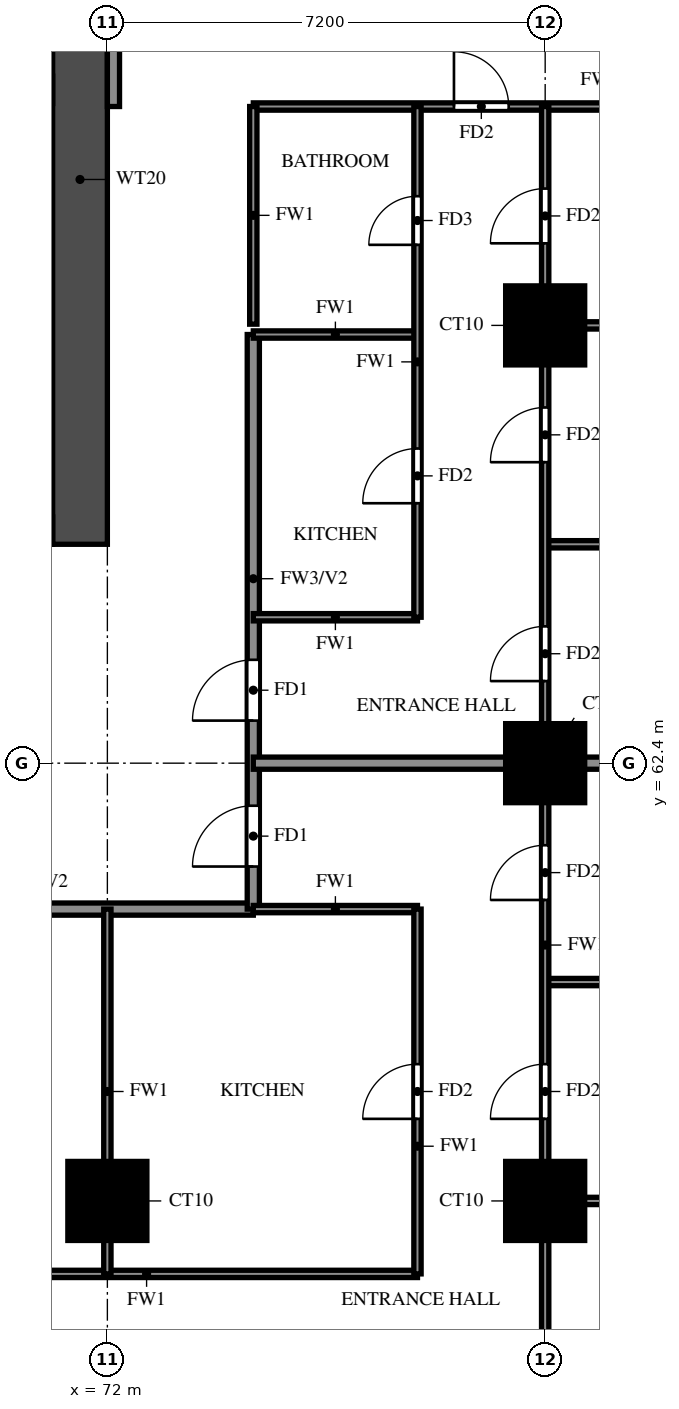
"""IFC4 building model, lengths in metres.
Left out: names, types, materials, properties, quantities, classifications, styles, units other than length and angle.
Written with IfcOpenShell. Run it as: python <this file> out.ifc"""

import sys

from ifc_helpers import new_model, si_unit, direction, frame, frame_2d, origin, origin_2d, place, context, subcontext, project, spatial, rectangle, extrude, source, transform, mapped, element, fill, save


model = new_model("IFC4")
c1 = context("Model", 3, precision=1e-05, world=origin(), true_north=direction((0.0, 1.0)))
c2 = subcontext(c1, "Body", "Model", "MODEL_VIEW")
j1 = project(units=[si_unit("LENGTHUNIT", "METRE"), si_unit("PLANEANGLEUNIT", "RADIAN")], contexts=[c1])
p1 = place(None, origin())
s1 = spatial("IfcSite", under=j1, at=p1, CompositionType="ELEMENT")
p2 = place(p1, origin())
s2 = spatial("IfcBuilding", under=s1, at=p2, CompositionType="ELEMENT")
p3 = place(p2, frame((0.0, 0.0, 79.5)))
s3 = spatial("IfcBuildingStorey", under=s2, at=p3, CompositionType="ELEMENT", Elevation=79.5)
m1 = source(origin(), c2, "Body", "SweptSolid", [
    extrude(rectangle(XDim=1.3, YDim=1.3, at=origin_2d()), origin(), (0.0, 0.0, 1.0), 3.18),
])
for number, where, z_axis, x_axis in (
    (1, (72.0, 55.2, 0.0), (0.0, 0.0, 1.0), (1.0, 0.0, 0.0)),
    (2, (79.2, 55.2, 0.0), (0.0, 0.0, 1.0), (1.0, 0.0, 0.0)),
    (3, (79.2, 62.4, 0.0), (0.0, 0.0, 1.0), (1.0, 0.0, 0.0)),
    (4, (79.2, 69.6, 0.0), (0.0, 0.0, 1.0), (1.0, 0.0, 0.0)),
):
    element("IfcColumn", number, at=place(p3, frame(where, z_axis=z_axis, x_axis=x_axis)), inside=s3, PredefinedType="COLUMN", context=c2, shape_type="MappedRepresentation", body=[
        mapped(m1, transform((0.0, 0.0, 0.0))),
    ])
p4 = place(p3, frame((71.55, 66.0, 0.0), z_axis=(0.0, 0.0, 1.0), x_axis=(0.0, 1.0, 0.0)))
e5 = element("IfcWall", 5, at=p4, inside=s3, PredefinedType="SHEAR", context=c2, shape_type="SweptSolid", body=[
    extrude(rectangle(XDim=12.0, YDim=0.9, at=frame_2d((6.0, 0.0))), origin(), (0.0, 0.0, 1.0), 3.18),
])
p5 = place(p3, frame((29.7, 66.225, 0.0), z_axis=(0.0, 0.0, 1.0), x_axis=(1.0, 0.0, 0.0)))
e6 = element("IfcWall", 6, at=p5, inside=s3, PredefinedType="SHEAR", context=c2, shape_type="SweptSolid", body=[
    extrude(rectangle(XDim=41.4, YDim=0.45, at=frame_2d((20.7, 0.0))), origin(), (0.0, 0.0, 1.0), 3.18),
])
p6 = place(p5, frame((0.925, 0.0, 0.0)))
e7 = element("IfcOpeningElement", 7, at=p6, cuts=e6, PredefinedType="OPENING", context=c2, shape_type="SweptSolid", body=[
    extrude(rectangle(XDim=1.1, YDim=2.1, at=frame_2d((0.55, 1.05))), frame((0.0, 0.235, 0.0), z_axis=(0.0, -1.0, 0.0), x_axis=(1.0, 0.0, 0.0)), (0.0, 0.0, 1.0), 0.47),
])
p7 = place(p5, frame((3.738, 0.0, 0.0)))
e8 = element("IfcOpeningElement", 8, at=p7, cuts=e6, PredefinedType="OPENING", context=c2, shape_type="SweptSolid", body=[
    extrude(rectangle(XDim=1.8, YDim=2.1, at=frame_2d((0.9, 1.05))), frame((0.0, 0.235, 0.0), z_axis=(0.0, -1.0, 0.0), x_axis=(1.0, 0.0, 0.0)), (0.0, 0.0, 1.0), 0.47),
])
p8 = place(p3, frame((67.2, 60.0, 0.0), z_axis=(0.0, 0.0, 1.0), x_axis=(1.0, 0.0, 0.0)))
e9 = element("IfcWall", 9, at=p8, inside=s3, PredefinedType="SOLIDWALL", context=c2, shape_type="SweptSolid", body=[
    extrude(rectangle(XDim=7.2, YDim=0.2, at=frame_2d((3.6, 0.0))), origin(), (0.0, 0.0, 1.0), 3.18),
])
p9 = place(p3, frame((72.1, 73.2, 0.0), z_axis=(0.0, 0.0, 1.0), x_axis=(0.0, 1.0, 0.0)))
e10 = element("IfcWall", 10, at=p9, inside=s3, PredefinedType="SOLIDWALL", context=c2, shape_type="SweptSolid", body=[
    extrude(rectangle(XDim=4.8, YDim=0.2, at=frame_2d((2.4, 0.0))), origin(), (0.0, 0.0, 1.0), 3.18),
])
p10 = place(p3, frame((74.4, 60.0, 0.0), z_axis=(0.0, 0.0, 1.0), x_axis=(0.0, 1.0, 0.0)))
e11 = element("IfcWall", 11, at=p10, inside=s3, PredefinedType="SOLIDWALL", context=c2, shape_type="SweptSolid", body=[
    extrude(rectangle(XDim=9.45, YDim=0.2, at=frame_2d((4.725, 0.0))), origin(), (0.0, 0.0, 1.0), 3.18),
])
p11 = place(p10, frame((0.7, 0.0, 0.0)))
e12 = element("IfcOpeningElement", 12, at=p11, cuts=e11, PredefinedType="OPENING", context=c2, shape_type="SweptSolid", body=[
    extrude(rectangle(XDim=1.0, YDim=2.1, at=frame_2d((0.5, 1.05))), frame((0.0, 0.11, 0.0), z_axis=(0.0, -1.0, 0.0), x_axis=(1.0, 0.0, 0.0)), (0.0, 0.0, 1.0), 0.22),
])
p12 = place(p10, frame((3.1, 0.0, 0.0)))
e13 = element("IfcOpeningElement", 13, at=p12, cuts=e11, PredefinedType="OPENING", context=c2, shape_type="SweptSolid", body=[
    extrude(rectangle(XDim=1.0, YDim=2.1, at=frame_2d((0.5, 1.05))), frame((0.0, 0.11, 0.0), z_axis=(0.0, -1.0, 0.0), x_axis=(1.0, 0.0, 0.0)), (0.0, 0.0, 1.0), 0.22),
])
p13 = place(p3, frame((74.4, 62.4, 0.0), z_axis=(0.0, 0.0, 1.0), x_axis=(1.0, 0.0, 0.0)))
e14 = element("IfcWall", 14, at=p13, inside=s3, PredefinedType="SOLIDWALL", context=c2, shape_type="SweptSolid", body=[
    extrude(rectangle(XDim=11.875, YDim=0.2, at=frame_2d((5.938, 0.0))), origin(), (0.0, 0.0, 1.0), 3.18),
])
p14 = place(p3, frame((67.2, 54.0, 0.0), z_axis=(0.0, 0.0, 1.0), x_axis=(1.0, 0.0, 0.0)))
e15 = element("IfcWall", 15, at=p14, inside=s3, PredefinedType="PARTITIONING", context=c2, shape_type="SweptSolid", body=[
    extrude(rectangle(XDim=9.9, YDim=0.12, at=frame_2d((4.95, 0.0))), origin(), (0.0, 0.0, 1.0), 3.18),
])
p15 = place(p14, frame((1.95, 0.0, 0.0)))
e16 = element("IfcOpeningElement", 16, at=p15, cuts=e15, PredefinedType="OPENING", context=c2, shape_type="SweptSolid", body=[
    extrude(rectangle(XDim=0.9, YDim=2.1, at=frame_2d((0.45, 1.05))), frame((0.0, 0.07, 0.0), z_axis=(0.0, -1.0, 0.0), x_axis=(1.0, 0.0, 0.0)), (0.0, 0.0, 1.0), 0.14),
])
p16 = place(p3, frame((79.2, 55.2, 0.0), z_axis=(0.0, 0.0, 1.0), x_axis=(1.0, 0.0, 0.0)))
e17 = element("IfcWall", 17, at=p16, inside=s3, PredefinedType="PARTITIONING", context=c2, shape_type="SweptSolid", body=[
    extrude(rectangle(XDim=7.075, YDim=0.12, at=frame_2d((3.538, 0.0))), origin(), (0.0, 0.0, 1.0), 3.18),
])
p17 = place(p3, frame((79.2, 58.8, 0.0), z_axis=(0.0, 0.0, 1.0), x_axis=(1.0, 0.0, 0.0)))
e18 = element("IfcWall", 18, at=p17, inside=s3, PredefinedType="PARTITIONING", context=c2, shape_type="SweptSolid", body=[
    extrude(rectangle(XDim=7.075, YDim=0.12, at=frame_2d((3.538, 0.0))), origin(), (0.0, 0.0, 1.0), 2.28),
])
for number, where, z_axis, x_axis in (
    (19, (74.4, 60.0, 0.0), (0.0, 0.0, 1.0), (1.0, 0.0, 0.0)),
    (20, (74.4, 64.8, 0.0), (0.0, 0.0, 1.0), (1.0, 0.0, 0.0)),
):
    element("IfcWall", number, at=place(p3, frame(where, z_axis=z_axis, x_axis=x_axis)), inside=s3, PredefinedType="PARTITIONING", context=c2, shape_type="SweptSolid", body=[
        extrude(rectangle(XDim=2.7, YDim=0.12, at=frame_2d((1.35, 0.0))), origin(), (0.0, 0.0, 1.0), 3.18),
    ])
p18 = place(p3, frame((79.2, 66.0, 0.0), z_axis=(0.0, 0.0, 1.0), x_axis=(1.0, 0.0, 0.0)))
e21 = element("IfcWall", 21, at=p18, inside=s3, PredefinedType="PARTITIONING", context=c2, shape_type="SweptSolid", body=[
    extrude(rectangle(XDim=7.075, YDim=0.12, at=frame_2d((3.538, 0.0))), origin(), (0.0, 0.0, 1.0), 2.28),
])
p19 = place(p3, frame((74.4, 69.45, 0.0), z_axis=(0.0, 0.0, 1.0), x_axis=(1.0, 0.0, 0.0)))
e22 = element("IfcWall", 22, at=p19, inside=s3, PredefinedType="PARTITIONING", context=c2, shape_type="SweptSolid", body=[
    extrude(rectangle(XDim=2.7, YDim=0.12, at=frame_2d((1.35, 0.0))), origin(), (0.0, 0.0, 1.0), 3.18),
])
p20 = place(p3, frame((79.2, 69.6, 0.0), z_axis=(0.0, 0.0, 1.0), x_axis=(1.0, 0.0, 0.0)))
e23 = element("IfcWall", 23, at=p20, inside=s3, PredefinedType="PARTITIONING", context=c2, shape_type="SweptSolid", body=[
    extrude(rectangle(XDim=7.075, YDim=0.12, at=frame_2d((3.538, 0.0))), origin(), (0.0, 0.0, 1.0), 3.18),
])
p21 = place(p3, frame((74.4, 73.2, 0.0), z_axis=(0.0, 0.0, 1.0), x_axis=(1.0, 0.0, 0.0)))
e24 = element("IfcWall", 24, at=p21, inside=s3, PredefinedType="PARTITIONING", context=c2, shape_type="SweptSolid", body=[
    extrude(rectangle(XDim=11.875, YDim=0.12, at=frame_2d((5.938, 0.0))), origin(), (0.0, 0.0, 1.0), 2.28),
])
p22 = place(p21, frame((3.3, 0.0, 0.0)))
e25 = element("IfcOpeningElement", 25, at=p22, cuts=e24, PredefinedType="OPENING", context=c2, shape_type="SweptSolid", body=[
    extrude(rectangle(XDim=0.9, YDim=2.1, at=frame_2d((0.45, 1.05))), frame((0.0, 0.07, 0.0), z_axis=(0.0, -1.0, 0.0), x_axis=(1.0, 0.0, 0.0)), (0.0, 0.0, 1.0), 0.14),
])
p23 = place(p3, frame((72.0, 54.0, 0.0), z_axis=(0.0, 0.0, 1.0), x_axis=(0.0, 1.0, 0.0)))
e26 = element("IfcWall", 26, at=p23, inside=s3, PredefinedType="PARTITIONING", context=c2, shape_type="SweptSolid", body=[
    extrude(rectangle(XDim=6.0, YDim=0.12, at=frame_2d((3.0, 0.0))), origin(), (0.0, 0.0, 1.0), 3.18),
])
p24 = place(p3, frame((74.4, 69.62, 0.0), z_axis=(0.0, 0.0, 1.0), x_axis=(0.0, 1.0, 0.0)))
e27 = element("IfcWall", 27, at=p24, inside=s3, PredefinedType="PARTITIONING", context=c2, shape_type="SweptSolid", body=[
    extrude(rectangle(XDim=3.58, YDim=0.12, at=frame_2d((1.79, 0.0))), origin(), (0.0, 0.0, 1.0), 3.18),
])
p25 = place(p3, frame((77.1, 54.0, 0.0), z_axis=(0.0, 0.0, 1.0), x_axis=(0.0, 1.0, 0.0)))
e28 = element("IfcWall", 28, at=p25, inside=s3, PredefinedType="PARTITIONING", context=c2, shape_type="SweptSolid", body=[
    extrude(rectangle(XDim=6.0, YDim=0.12, at=frame_2d((3.0, 0.0))), origin(), (0.0, 0.0, 1.0), 3.18),
])
p26 = place(p25, frame((2.55, 0.0, 0.0)))
e29 = element("IfcOpeningElement", 29, at=p26, cuts=e28, PredefinedType="OPENING", context=c2, shape_type="SweptSolid", body=[
    extrude(rectangle(XDim=0.9, YDim=2.1, at=frame_2d((0.45, 1.05))), frame((0.0, 0.07, 0.0), z_axis=(0.0, -1.0, 0.0), x_axis=(1.0, 0.0, 0.0)), (0.0, 0.0, 1.0), 0.14),
])
p27 = place(p3, frame((77.1, 64.8, 0.0), z_axis=(0.0, 0.0, 1.0), x_axis=(0.0, 1.0, 0.0)))
e30 = element("IfcWall", 30, at=p27, inside=s3, PredefinedType="PARTITIONING", context=c2, shape_type="SweptSolid", body=[
    extrude(rectangle(XDim=8.4, YDim=0.12, at=frame_2d((4.2, 0.0))), origin(), (0.0, 0.0, 1.0), 3.18),
])
p28 = place(p27, frame((1.875, 0.0, 0.0)))
e31 = element("IfcOpeningElement", 31, at=p28, cuts=e30, PredefinedType="OPENING", context=c2, shape_type="SweptSolid", body=[
    extrude(rectangle(XDim=0.9, YDim=2.1, at=frame_2d((0.45, 1.05))), frame((0.0, 0.07, 0.0), z_axis=(0.0, -1.0, 0.0), x_axis=(1.0, 0.0, 0.0)), (0.0, 0.0, 1.0), 0.14),
])
p29 = place(p27, frame((6.125, 0.0, 0.0)))
e32 = element("IfcOpeningElement", 32, at=p29, cuts=e30, PredefinedType="OPENING", context=c2, shape_type="SweptSolid", body=[
    extrude(rectangle(XDim=0.8, YDim=2.1, at=frame_2d((0.4, 1.05))), frame((0.0, 0.07, 0.0), z_axis=(0.0, -1.0, 0.0), x_axis=(1.0, 0.0, 0.0)), (0.0, 0.0, 1.0), 0.14),
])
p30 = place(p3, frame((79.2, 48.125, 0.0), z_axis=(0.0, 0.0, 1.0), x_axis=(0.0, 1.0, 0.0)))
e33 = element("IfcWall", 33, at=p30, inside=s3, PredefinedType="PARTITIONING", context=c2, shape_type="SweptSolid", body=[
    extrude(rectangle(XDim=25.075, YDim=0.12, at=frame_2d((12.538, 0.0))), origin(), (0.0, 0.0, 1.0), 3.18),
])
p31 = place(p30, frame((2.788, 0.0, 0.0)))
e34 = element("IfcOpeningElement", 34, at=p31, cuts=e33, PredefinedType="OPENING", context=c2, shape_type="SweptSolid", body=[
    extrude(rectangle(XDim=1.5, YDim=2.1, at=frame_2d((0.75, 1.05))), frame((0.0, 0.07, 0.0), z_axis=(0.0, -1.0, 0.0), x_axis=(1.0, 0.0, 0.0)), (0.0, 0.0, 1.0), 0.14),
])
p32 = place(p30, frame((8.425, 0.0, 0.0)))
e35 = element("IfcOpeningElement", 35, at=p32, cuts=e33, PredefinedType="OPENING", context=c2, shape_type="SweptSolid", body=[
    extrude(rectangle(XDim=0.9, YDim=2.1, at=frame_2d((0.45, 1.05))), frame((0.0, 0.07, 0.0), z_axis=(0.0, -1.0, 0.0), x_axis=(1.0, 0.0, 0.0)), (0.0, 0.0, 1.0), 0.14),
])
p33 = place(p30, frame((12.025, 0.0, 0.0)))
e36 = element("IfcOpeningElement", 36, at=p33, cuts=e33, PredefinedType="OPENING", context=c2, shape_type="SweptSolid", body=[
    extrude(rectangle(XDim=0.9, YDim=2.1, at=frame_2d((0.45, 1.05))), frame((0.0, 0.07, 0.0), z_axis=(0.0, -1.0, 0.0), x_axis=(1.0, 0.0, 0.0)), (0.0, 0.0, 1.0), 0.14),
])
p34 = place(p30, frame((15.625, 0.0, 0.0)))
e37 = element("IfcOpeningElement", 37, at=p34, cuts=e33, PredefinedType="OPENING", context=c2, shape_type="SweptSolid", body=[
    extrude(rectangle(XDim=0.9, YDim=2.1, at=frame_2d((0.45, 1.05))), frame((0.0, 0.07, 0.0), z_axis=(0.0, -1.0, 0.0), x_axis=(1.0, 0.0, 0.0)), (0.0, 0.0, 1.0), 0.14),
])
p35 = place(p30, frame((19.225, 0.0, 0.0)))
e38 = element("IfcOpeningElement", 38, at=p35, cuts=e33, PredefinedType="OPENING", context=c2, shape_type="SweptSolid", body=[
    extrude(rectangle(XDim=0.9, YDim=2.1, at=frame_2d((0.45, 1.05))), frame((0.0, 0.07, 0.0), z_axis=(0.0, -1.0, 0.0), x_axis=(1.0, 0.0, 0.0)), (0.0, 0.0, 1.0), 0.14),
])
p36 = place(p30, frame((22.825, 0.0, 0.0)))
e39 = element("IfcOpeningElement", 39, at=p36, cuts=e33, PredefinedType="OPENING", context=c2, shape_type="SweptSolid", body=[
    extrude(rectangle(XDim=0.9, YDim=2.1, at=frame_2d((0.45, 1.05))), frame((0.0, 0.07, 0.0), z_axis=(0.0, -1.0, 0.0), x_axis=(1.0, 0.0, 0.0)), (0.0, 0.0, 1.0), 0.14),
])
p37 = place(p11, origin())
e40 = element("IfcDoor", 40, at=p37, inside=s3, OperationType="SINGLE_SWING_LEFT", PredefinedType="DOOR", context=c2, shape_type="SweptSolid", body=[
    extrude(rectangle(XDim=1.0, YDim=2.1, at=frame_2d((0.5, 1.05))), frame((0.0, 0.025, 0.0), z_axis=(0.0, -1.0, 0.0), x_axis=(1.0, 0.0, 0.0)), (0.0, 0.0, 1.0), 0.05),
])
fill(e12, e40)
p38 = place(p32, origin())
e41 = element("IfcDoor", 41, at=p38, inside=s3, OperationType="SINGLE_SWING_RIGHT", PredefinedType="DOOR", context=c2, shape_type="SweptSolid", body=[
    extrude(rectangle(XDim=0.9, YDim=2.1, at=frame_2d((0.45, 1.05))), frame((0.0, 0.025, 0.0), z_axis=(0.0, -1.0, 0.0), x_axis=(1.0, 0.0, 0.0)), (0.0, 0.0, 1.0), 0.05),
])
fill(e35, e41)
p39 = place(p33, origin())
e42 = element("IfcDoor", 42, at=p39, inside=s3, OperationType="SINGLE_SWING_LEFT", PredefinedType="DOOR", context=c2, shape_type="SweptSolid", body=[
    extrude(rectangle(XDim=0.9, YDim=2.1, at=frame_2d((0.45, 1.05))), frame((0.0, 0.025, 0.0), z_axis=(0.0, -1.0, 0.0), x_axis=(1.0, 0.0, 0.0)), (0.0, 0.0, 1.0), 0.05),
])
fill(e36, e42)
p40 = place(p26, origin())
e43 = element("IfcDoor", 43, at=p40, inside=s3, OperationType="SINGLE_SWING_RIGHT", PredefinedType="DOOR", context=c2, shape_type="SweptSolid", body=[
    extrude(rectangle(XDim=0.9, YDim=2.1, at=frame_2d((0.45, 1.05))), frame((0.0, 0.025, 0.0), z_axis=(0.0, -1.0, 0.0), x_axis=(1.0, 0.0, 0.0)), (0.0, 0.0, 1.0), 0.05),
])
fill(e29, e43)
p41 = place(p12, origin())
e44 = element("IfcDoor", 44, at=p41, inside=s3, OperationType="SINGLE_SWING_LEFT", PredefinedType="DOOR", context=c2, shape_type="SweptSolid", body=[
    extrude(rectangle(XDim=1.0, YDim=2.1, at=frame_2d((0.5, 1.05))), frame((0.0, 0.025, 0.0), z_axis=(0.0, -1.0, 0.0), x_axis=(1.0, 0.0, 0.0)), (0.0, 0.0, 1.0), 0.05),
])
fill(e13, e44)
p42 = place(p34, origin())
e45 = element("IfcDoor", 45, at=p42, inside=s3, OperationType="SINGLE_SWING_LEFT", PredefinedType="DOOR", context=c2, shape_type="SweptSolid", body=[
    extrude(rectangle(XDim=0.9, YDim=2.1, at=frame_2d((0.45, 1.05))), frame((0.0, 0.025, 0.0), z_axis=(0.0, -1.0, 0.0), x_axis=(1.0, 0.0, 0.0)), (0.0, 0.0, 1.0), 0.05),
])
fill(e37, e45)
p43 = place(p35, origin())
e46 = element("IfcDoor", 46, at=p43, inside=s3, OperationType="SINGLE_SWING_RIGHT", PredefinedType="DOOR", context=c2, shape_type="SweptSolid", body=[
    extrude(rectangle(XDim=0.9, YDim=2.1, at=frame_2d((0.45, 1.05))), frame((0.0, 0.025, 0.0), z_axis=(0.0, -1.0, 0.0), x_axis=(1.0, 0.0, 0.0)), (0.0, 0.0, 1.0), 0.05),
])
fill(e38, e46)
p44 = place(p36, origin())
e47 = element("IfcDoor", 47, at=p44, inside=s3, OperationType="SINGLE_SWING_LEFT", PredefinedType="DOOR", context=c2, shape_type="SweptSolid", body=[
    extrude(rectangle(XDim=0.9, YDim=2.1, at=frame_2d((0.45, 1.05))), frame((0.0, 0.025, 0.0), z_axis=(0.0, -1.0, 0.0), x_axis=(1.0, 0.0, 0.0)), (0.0, 0.0, 1.0), 0.05),
])
fill(e39, e47)
p45 = place(p22, origin())
e48 = element("IfcDoor", 48, at=p45, inside=s3, OperationType="SINGLE_SWING_LEFT", PredefinedType="DOOR", context=c2, shape_type="SweptSolid", body=[
    extrude(rectangle(XDim=0.9, YDim=2.1, at=frame_2d((0.45, 1.05))), frame((0.0, 0.025, 0.0), z_axis=(0.0, -1.0, 0.0), x_axis=(1.0, 0.0, 0.0)), (0.0, 0.0, 1.0), 0.05),
])
fill(e25, e48)
p46 = place(p28, origin())
e49 = element("IfcDoor", 49, at=p46, inside=s3, OperationType="SINGLE_SWING_RIGHT", PredefinedType="DOOR", context=c2, shape_type="SweptSolid", body=[
    extrude(rectangle(XDim=0.9, YDim=2.1, at=frame_2d((0.45, 1.05))), frame((0.0, 0.025, 0.0), z_axis=(0.0, -1.0, 0.0), x_axis=(1.0, 0.0, 0.0)), (0.0, 0.0, 1.0), 0.05),
])
fill(e31, e49)
p47 = place(p29, origin())
e50 = element("IfcDoor", 50, at=p47, inside=s3, OperationType="SINGLE_SWING_LEFT", PredefinedType="DOOR", context=c2, shape_type="SweptSolid", body=[
    extrude(rectangle(XDim=0.8, YDim=2.1, at=frame_2d((0.4, 1.05))), frame((0.0, 0.025, 0.0), z_axis=(0.0, -1.0, 0.0), x_axis=(1.0, 0.0, 0.0)), (0.0, 0.0, 1.0), 0.05),
])
fill(e32, e50)
save(model, sys.argv[1])
